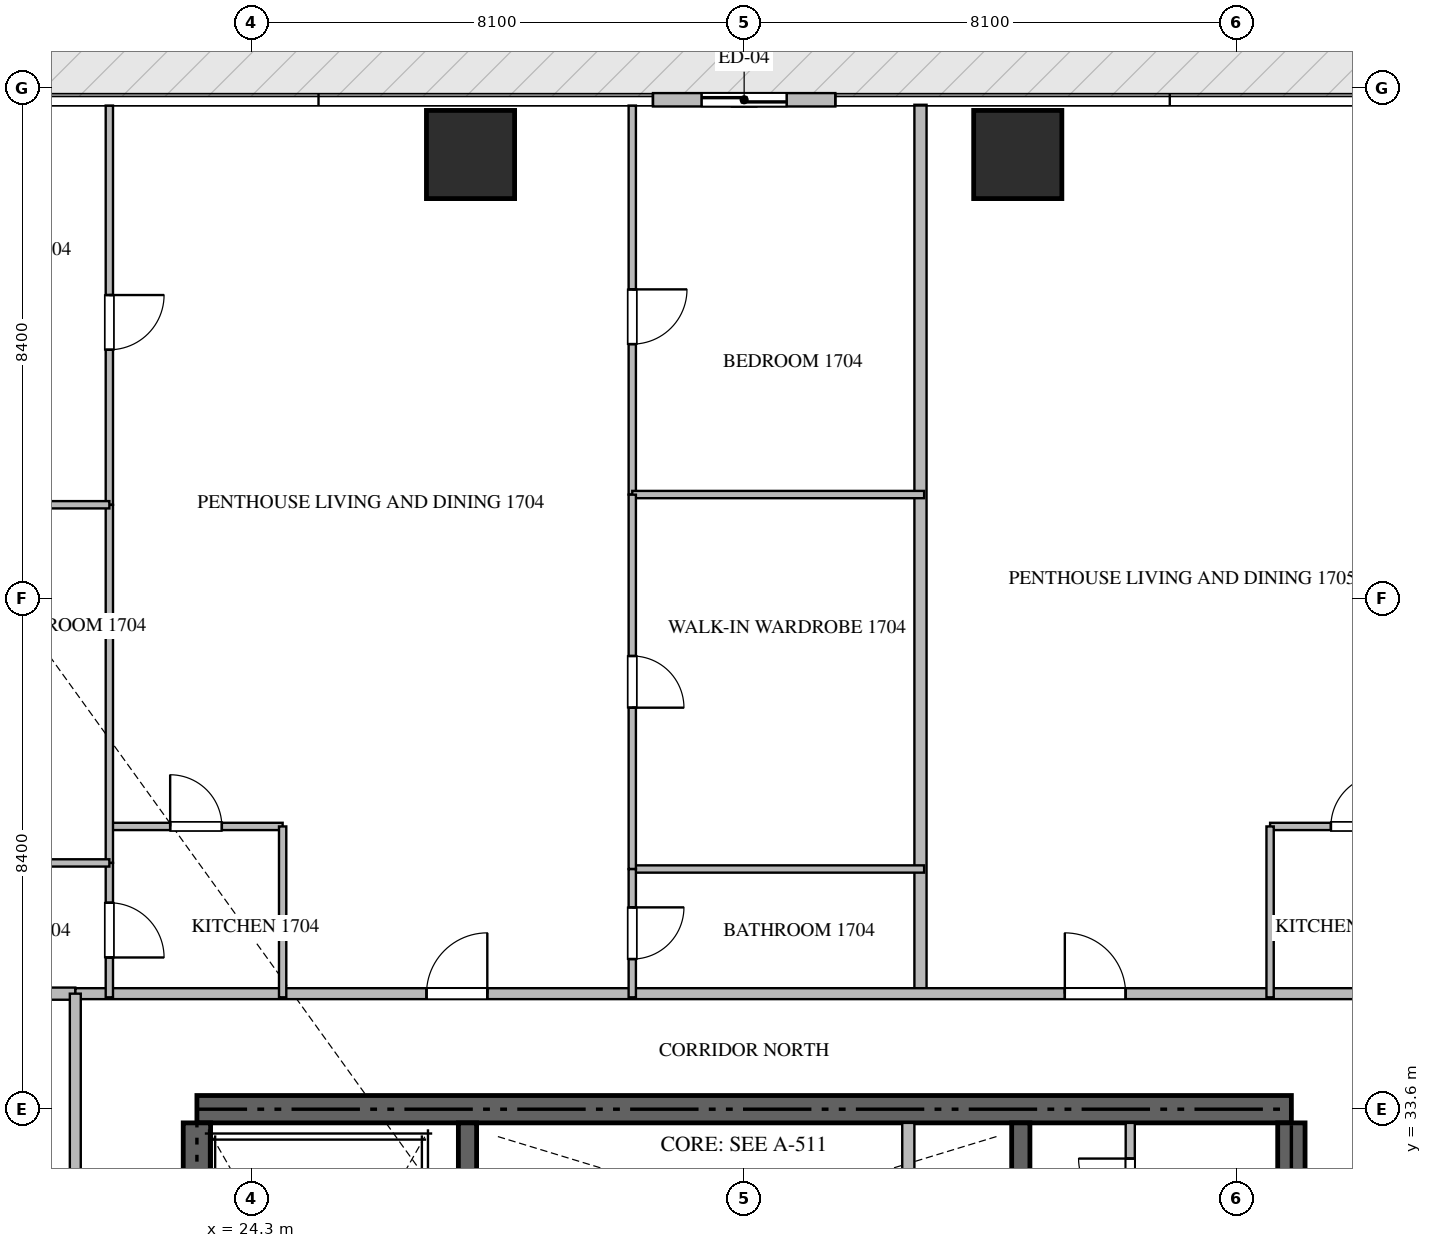
"""IFC4 building model, lengths in metres.
Left out: names, types, materials, properties, quantities, classifications, styles, units other than length and angle.
Written with IfcOpenShell. Run it as: python <this file> out.ifc"""

import sys

from ifc_helpers import new_model, si_unit, direction, frame, frame_2d, origin, origin_2d, place, context, subcontext, project, spatial, rectangle, extrude, source, transform, mapped, element, fill, save


model = new_model("IFC4")
c1 = context("Model", 3, precision=1e-05, world=origin(), true_north=direction((0.0, 1.0)))
c2 = subcontext(c1, "Body", "Model", "MODEL_VIEW")
j1 = project(units=[si_unit("LENGTHUNIT", "METRE"), si_unit("PLANEANGLEUNIT", "RADIAN")], contexts=[c1])
p1 = place(None, origin())
s1 = spatial("IfcSite", under=j1, at=p1, CompositionType="ELEMENT")
p2 = place(p1, origin())
s2 = spatial("IfcBuilding", under=s1, at=p2, CompositionType="ELEMENT")
p3 = place(p2, frame((0.0, 0.0, 71.7)))
s3 = spatial("IfcBuildingStorey", under=s2, at=p3, CompositionType="ELEMENT", Elevation=71.7)
p4 = place(p3, frame((41.4, 33.6, -0.26), z_axis=(0.0, 0.0, 1.0), x_axis=(-1.0, 0.0, 0.0)))
e1 = element("IfcWall", 1, at=p4, inside=s3, PredefinedType="SHEAR", context=c2, shape_type="SweptSolid", body=[
    extrude(rectangle(XDim=18.0, YDim=0.45, at=frame_2d((9.0, 0.0))), origin(), (0.0, 0.0, 1.0), 3.748),
])
p5 = place(p3, frame((23.4, 24.25, -0.26), z_axis=(0.0, 0.0, 1.0), x_axis=(0.0, 1.0, 0.0)))
e2 = element("IfcWall", 2, at=p5, inside=s3, PredefinedType="SHEAR", context=c2, shape_type="SweptSolid", body=[
    extrude(rectangle(XDim=9.125, YDim=0.45, at=frame_2d((4.562, 0.0))), origin(), (0.0, 0.0, 1.0), 3.748),
])
p6 = place(p3, frame((41.4, 27.75, -0.26), z_axis=(0.0, 0.0, 1.0), x_axis=(0.0, 1.0, 0.0)))
e3 = element("IfcWall", 3, at=p6, inside=s3, PredefinedType="SHEAR", context=c2, shape_type="SweptSolid", body=[
    extrude(rectangle(XDim=5.625, YDim=0.45, at=frame_2d((2.812, 0.0))), origin(), (0.0, 0.0, 1.0), 3.748),
])
p7 = place(p3, frame((27.85, 23.55, -0.26), z_axis=(0.0, 0.0, 1.0), x_axis=(0.0, 1.0, 0.0)))
e4 = element("IfcWall", 4, at=p7, inside=s3, PredefinedType="SHEAR", context=c2, shape_type="SweptSolid", body=[
    extrude(rectangle(XDim=9.825, YDim=0.3, at=frame_2d((4.913, 0.0))), origin(), (0.0, 0.0, 1.0), 3.748),
])
p8 = place(p3, frame((36.95, 27.05, -0.26), z_axis=(0.0, 0.0, 1.0), x_axis=(0.0, 1.0, 0.0)))
e5 = element("IfcWall", 5, at=p8, inside=s3, PredefinedType="SHEAR", context=c2, shape_type="SweptSolid", body=[
    extrude(rectangle(XDim=6.325, YDim=0.3, at=frame_2d((3.163, 0.0))), origin(), (0.0, 0.0, 1.0), 3.748),
])
m1 = source(origin(), c2, "Body", "SweptSolid", [
    extrude(rectangle(XDim=1.45, YDim=1.45, at=origin_2d()), origin(), (0.0, 0.0, 1.0), 3.75),
])
for number, where, z_axis, x_axis in (
    (6, (27.9, 49.3, -0.26), (0.0, 0.0, 1.0), (1.0, 0.0, 0.0)),
    (7, (36.9, 49.3, -0.26), (0.0, 0.0, 1.0), (1.0, 0.0, 0.0)),
):
    element("IfcColumn", number, at=place(p3, frame(where, z_axis=z_axis, x_axis=x_axis)), inside=s3, PredefinedType="COLUMN", context=c2, shape_type="MappedRepresentation", body=[
        mapped(m1, transform((0.0, 0.0, 0.0), scale=1.0)),
    ])
p9 = place(p3, frame((33.9, 50.2, 0.0), z_axis=(0.0, 0.0, 1.0), x_axis=(-1.0, 0.0, 0.0)))
e8 = element("IfcWall", 8, at=p9, inside=s3, PredefinedType="ELEMENTEDWALL", context=c2, shape_type="SweptSolid", body=[
    extrude(rectangle(XDim=3.0, YDim=0.22, at=frame_2d((1.5, 0.0))), origin(), (0.0, 0.0, 1.0), 3.475),
])
p10 = place(p9, frame((0.8, 0.0, 0.0)))
e9 = element("IfcOpeningElement", 9, at=p10, cuts=e8, PredefinedType="OPENING", context=c2, shape_type="SweptSolid", body=[
    extrude(rectangle(XDim=1.4, YDim=2.25, at=frame_2d((0.7, 1.125))), frame((0.0, 0.12, 0.0), z_axis=(0.0, -1.0, 0.0), x_axis=(1.0, 0.0, 0.0)), (0.0, 0.0, 1.0), 0.24),
])
p11 = place(p3, frame((35.1, 30.75, 0.0), z_axis=(0.0, 0.0, 1.0), x_axis=(0.0, 1.0, 0.0)))
e10 = element("IfcWall", 10, at=p11, inside=s3, PredefinedType="STANDARD", context=c2, shape_type="SweptSolid", body=[
    extrude(rectangle(XDim=2.625, YDim=0.2, at=frame_2d((1.312, 0.0))), origin(), (0.0, 0.0, 1.0), 3.49),
])
p12 = place(p3, frame((38.75, 31.352, 0.0), z_axis=(0.0, 0.0, 1.0), x_axis=(0.0, 1.0, 0.0)))
e11 = element("IfcWall", 11, at=p12, inside=s3, PredefinedType="PARTITIONING", context=c2, shape_type="SweptSolid", body=[
    extrude(rectangle(XDim=2.023, YDim=0.15, at=frame_2d((1.011, 0.0))), origin(), (0.0, 0.0, 1.0), 3.49),
])
p13 = place(p12, frame((0.586, 0.0, 0.0)))
e12 = element("IfcOpeningElement", 12, at=p13, cuts=e11, PredefinedType="OPENING", context=c2, shape_type="SweptSolid", body=[
    extrude(rectangle(XDim=0.85, YDim=2.1, at=frame_2d((0.425, 1.05))), frame((0.0, 0.085, 0.0), z_axis=(0.0, -1.0, 0.0), x_axis=(1.0, 0.0, 0.0)), (0.0, 0.0, 1.0), 0.17),
])
p14 = place(p3, frame((35.3, 35.5, 0.0), z_axis=(0.0, 0.0, 1.0), x_axis=(0.0, 1.0, 0.0)))
e13 = element("IfcWall", 13, at=p14, inside=s3, PredefinedType="PARTITIONING", context=c2, shape_type="SweptSolid", body=[
    extrude(rectangle(XDim=14.618, YDim=0.2, at=frame_2d((7.309, 0.0))), origin(), (0.0, 0.0, 1.0), 3.49),
])
p15 = place(p3, frame((6.082, 35.5, 0.0), z_axis=(0.0, 0.0, 1.0), x_axis=(1.0, 0.0, 0.0)))
e14 = element("IfcWall", 14, at=p15, inside=s3, PredefinedType="PARTITIONING", context=c2, shape_type="SweptSolid", body=[
    extrude(rectangle(XDim=15.318, YDim=0.2, at=frame_2d((7.659, 0.0))), origin(), (0.0, 0.0, 1.0), 3.49),
])
p16 = place(p3, frame((21.402, 35.5, 0.0), z_axis=(0.0, 0.0, 1.0), x_axis=(1.0, 0.0, 0.0)))
e15 = element("IfcWall", 15, at=p16, inside=s3, PredefinedType="PARTITIONING", context=c2, shape_type="SweptSolid", body=[
    extrude(rectangle(XDim=21.996, YDim=0.18, at=frame_2d((10.998, 0.0))), origin(), (0.0, 0.0, 1.0), 3.49),
])
p17 = place(p16, frame((5.774, 0.0, 0.0)))
e16 = element("IfcOpeningElement", 16, at=p17, cuts=e15, PredefinedType="OPENING", context=c2, shape_type="SweptSolid", body=[
    extrude(rectangle(XDim=1.0, YDim=2.15, at=frame_2d((0.5, 1.075))), frame((0.0, 0.1, 0.0), z_axis=(0.0, -1.0, 0.0), x_axis=(1.0, 0.0, 0.0)), (0.0, 0.0, 1.0), 0.2),
])
p18 = place(p16, frame((16.272, 0.0, 0.0)))
e17 = element("IfcOpeningElement", 17, at=p18, cuts=e15, PredefinedType="OPENING", context=c2, shape_type="SweptSolid", body=[
    extrude(rectangle(XDim=1.0, YDim=2.15, at=frame_2d((0.5, 1.075))), frame((0.0, 0.1, 0.0), z_axis=(0.0, -1.0, 0.0), x_axis=(1.0, 0.0, 0.0)), (0.0, 0.0, 1.0), 0.2),
])
p19 = place(p3, frame((21.4, 14.9, 0.0), z_axis=(0.0, 0.0, 1.0), x_axis=(0.0, 1.0, 0.0)))
e18 = element("IfcWall", 18, at=p19, inside=s3, PredefinedType="PARTITIONING", context=c2, shape_type="SweptSolid", body=[
    extrude(rectangle(XDim=20.6, YDim=0.18, at=frame_2d((10.3, 0.0))), origin(), (0.0, 0.0, 1.0), 3.49),
])
p20 = place(p19, frame((1.96, 0.0, 0.0)))
e19 = element("IfcOpeningElement", 19, at=p20, cuts=e18, PredefinedType="OPENING", context=c2, shape_type="SweptSolid", body=[
    extrude(rectangle(XDim=1.0, YDim=2.15, at=frame_2d((0.5, 1.075))), frame((0.0, 0.1, 0.0), z_axis=(0.0, -1.0, 0.0), x_axis=(1.0, 0.0, 0.0)), (0.0, 0.0, 1.0), 0.2),
])
p21 = place(p19, frame((15.778, 0.0, 0.0)))
e20 = element("IfcOpeningElement", 20, at=p21, cuts=e18, PredefinedType="OPENING", context=c2, shape_type="SweptSolid", body=[
    extrude(rectangle(XDim=1.0, YDim=2.15, at=frame_2d((0.5, 1.075))), frame((0.0, 0.1, 0.0), z_axis=(0.0, -1.0, 0.0), x_axis=(1.0, 0.0, 0.0)), (0.0, 0.0, 1.0), 0.2),
])
p22 = place(p3, frame((21.96, 38.25, 0.0), z_axis=(0.0, 0.0, 1.0), x_axis=(1.0, 0.0, 0.0)))
e21 = element("IfcWall", 21, at=p22, inside=s3, PredefinedType="PARTITIONING", context=c2, shape_type="SweptSolid", body=[
    extrude(rectangle(XDim=2.85, YDim=0.12, at=frame_2d((1.425, 0.0))), origin(), (0.0, 0.0, 1.0), 3.49),
])
p23 = place(p22, frame((1.0, 0.0, 0.0)))
e22 = element("IfcOpeningElement", 22, at=p23, cuts=e21, PredefinedType="OPENING", context=c2, shape_type="SweptSolid", body=[
    extrude(rectangle(XDim=0.85, YDim=2.1, at=frame_2d((0.425, 1.05))), frame((0.0, 0.07, 0.0), z_axis=(0.0, -1.0, 0.0), x_axis=(1.0, 0.0, 0.0)), (0.0, 0.0, 1.0), 0.14),
])
p24 = place(p3, frame((24.81, 38.25, 0.0), z_axis=(0.0, 0.0, 1.0), x_axis=(0.0, -1.0, 0.0)))
e23 = element("IfcWall", 23, at=p24, inside=s3, PredefinedType="PARTITIONING", context=c2, shape_type="SweptSolid", body=[
    extrude(rectangle(XDim=2.81, YDim=0.12, at=frame_2d((1.405, 0.0))), origin(), (0.0, 0.0, 1.0), 3.49),
])
p25 = place(p3, frame((21.96, 37.65, 0.0), z_axis=(0.0, 0.0, 1.0), x_axis=(0.0, -1.0, 0.0)))
e24 = element("IfcWall", 24, at=p25, inside=s3, PredefinedType="PARTITIONING", context=c2, shape_type="SweptSolid", body=[
    extrude(rectangle(XDim=2.21, YDim=0.12, at=frame_2d((1.105, 0.0))), origin(), (0.0, 0.0, 1.0), 3.49),
])
p26 = place(p25, frame((0.655, 0.0, 0.0)))
e25 = element("IfcOpeningElement", 25, at=p26, cuts=e24, PredefinedType="OPENING", context=c2, shape_type="SweptSolid", body=[
    extrude(rectangle(XDim=0.9, YDim=2.1, at=frame_2d((0.45, 1.05))), frame((0.0, 0.07, 0.0), z_axis=(0.0, -1.0, 0.0), x_axis=(1.0, 0.0, 0.0)), (0.0, 0.0, 1.0), 0.14),
])
p27 = place(p3, frame((21.96, 50.105, 0.0), z_axis=(0.0, 0.0, 1.0), x_axis=(0.0, -1.0, 0.0)))
e26 = element("IfcWall", 26, at=p27, inside=s3, PredefinedType="PARTITIONING", context=c2, shape_type="SweptSolid", body=[
    extrude(rectangle(XDim=6.565, YDim=0.12, at=frame_2d((3.282, 0.0))), origin(), (0.0, 0.0, 1.0), 3.49),
])
p28 = place(p27, frame((3.116, 0.0, 0.0)))
e27 = element("IfcOpeningElement", 27, at=p28, cuts=e26, PredefinedType="OPENING", context=c2, shape_type="SweptSolid", body=[
    extrude(rectangle(XDim=0.9, YDim=2.1, at=frame_2d((0.45, 1.05))), frame((0.0, 0.07, 0.0), z_axis=(0.0, -1.0, 0.0), x_axis=(1.0, 0.0, 0.0)), (0.0, 0.0, 1.0), 0.14),
])
p29 = place(p3, frame((21.96, 43.538, 0.0), z_axis=(0.0, 0.0, 1.0), x_axis=(0.0, -1.0, 0.0)))
e28 = element("IfcWall", 28, at=p29, inside=s3, PredefinedType="PARTITIONING", context=c2, shape_type="SweptSolid", body=[
    extrude(rectangle(XDim=5.886, YDim=0.12, at=frame_2d((2.943, 0.0))), origin(), (0.0, 0.0, 1.0), 3.49),
])
p30 = place(p3, frame((16.81, 43.54, 0.0), z_axis=(0.0, 0.0, 1.0), x_axis=(1.0, 0.0, 0.0)))
e29 = element("IfcWall", 29, at=p30, inside=s3, PredefinedType="PARTITIONING", context=c2, shape_type="SweptSolid", body=[
    extrude(rectangle(XDim=5.15, YDim=0.12, at=frame_2d((2.575, 0.0))), origin(), (0.0, 0.0, 1.0), 3.49),
])
p31 = place(p3, frame((18.912, 37.65, 0.0), z_axis=(0.0, 0.0, 1.0), x_axis=(1.0, 0.0, 0.0)))
e30 = element("IfcWall", 30, at=p31, inside=s3, PredefinedType="PARTITIONING", context=c2, shape_type="SweptSolid", body=[
    extrude(rectangle(XDim=3.048, YDim=0.12, at=frame_2d((1.524, 0.0))), origin(), (0.0, 0.0, 1.0), 3.49),
])
p32 = place(p31, frame((1.099, 0.0, 0.0)))
e31 = element("IfcOpeningElement", 31, at=p32, cuts=e30, PredefinedType="OPENING", context=c2, shape_type="SweptSolid", body=[
    extrude(rectangle(XDim=0.85, YDim=2.1, at=frame_2d((0.425, 1.05))), frame((0.0, 0.07, 0.0), z_axis=(0.0, -1.0, 0.0), x_axis=(1.0, 0.0, 0.0)), (0.0, 0.0, 1.0), 0.14),
])
p33 = place(p3, frame((30.56, 50.105, 0.0), z_axis=(0.0, 0.0, 1.0), x_axis=(0.0, -1.0, 0.0)))
e32 = element("IfcWall", 32, at=p33, inside=s3, PredefinedType="PARTITIONING", context=c2, shape_type="SweptSolid", body=[
    extrude(rectangle(XDim=6.397, YDim=0.12, at=frame_2d((3.198, 0.0))), origin(), (0.0, 0.0, 1.0), 3.49),
])
p34 = place(p33, frame((3.023, 0.0, 0.0)))
e33 = element("IfcOpeningElement", 33, at=p34, cuts=e32, PredefinedType="OPENING", context=c2, shape_type="SweptSolid", body=[
    extrude(rectangle(XDim=0.9, YDim=2.1, at=frame_2d((0.45, 1.05))), frame((0.0, 0.07, 0.0), z_axis=(0.0, -1.0, 0.0), x_axis=(1.0, 0.0, 0.0)), (0.0, 0.0, 1.0), 0.14),
])
for number, where, z_axis, x_axis in (
    (34, (30.56, 43.708, 0.0), (0.0, 0.0, 1.0), (1.0, 0.0, 0.0)),
    (35, (30.56, 37.55, 0.0), (0.0, 0.0, 1.0), (1.0, 0.0, 0.0)),
):
    element("IfcWall", number, at=place(p3, frame(where, z_axis=z_axis, x_axis=x_axis)), inside=s3, PredefinedType="PARTITIONING", context=c2, shape_type="SweptSolid", body=[
        extrude(rectangle(XDim=4.8, YDim=0.12, at=frame_2d((2.4, 0.0))), origin(), (0.0, 0.0, 1.0), 3.49),
    ])
p35 = place(p3, frame((30.56, 43.706, 0.0), z_axis=(0.0, 0.0, 1.0), x_axis=(0.0, -1.0, 0.0)))
e36 = element("IfcWall", 36, at=p35, inside=s3, PredefinedType="PARTITIONING", context=c2, shape_type="SweptSolid", body=[
    extrude(rectangle(XDim=6.156, YDim=0.12, at=frame_2d((3.078, 0.0))), origin(), (0.0, 0.0, 1.0), 3.49),
])
p36 = place(p35, frame((2.653, 0.0, 0.0)))
e37 = element("IfcOpeningElement", 37, at=p36, cuts=e36, PredefinedType="OPENING", context=c2, shape_type="SweptSolid", body=[
    extrude(rectangle(XDim=0.85, YDim=2.1, at=frame_2d((0.425, 1.05))), frame((0.0, 0.07, 0.0), z_axis=(0.0, -1.0, 0.0), x_axis=(1.0, 0.0, 0.0)), (0.0, 0.0, 1.0), 0.14),
])
p37 = place(p3, frame((30.56, 37.548, 0.0), z_axis=(0.0, 0.0, 1.0), x_axis=(0.0, -1.0, 0.0)))
e38 = element("IfcWall", 38, at=p37, inside=s3, PredefinedType="PARTITIONING", context=c2, shape_type="SweptSolid", body=[
    extrude(rectangle(XDim=2.108, YDim=0.12, at=frame_2d((1.054, 0.0))), origin(), (0.0, 0.0, 1.0), 3.49),
])
p38 = place(p37, frame((0.629, 0.0, 0.0)))
e39 = element("IfcOpeningElement", 39, at=p38, cuts=e38, PredefinedType="OPENING", context=c2, shape_type="SweptSolid", body=[
    extrude(rectangle(XDim=0.85, YDim=2.1, at=frame_2d((0.425, 1.05))), frame((0.0, 0.07, 0.0), z_axis=(0.0, -1.0, 0.0), x_axis=(1.0, 0.0, 0.0)), (0.0, 0.0, 1.0), 0.14),
])
p39 = place(p3, frame((41.05, 38.25, 0.0), z_axis=(0.0, 0.0, 1.0), x_axis=(1.0, 0.0, 0.0)))
e40 = element("IfcWall", 40, at=p39, inside=s3, PredefinedType="PARTITIONING", context=c2, shape_type="SweptSolid", body=[
    extrude(rectangle(XDim=2.85, YDim=0.12, at=frame_2d((1.425, 0.0))), origin(), (0.0, 0.0, 1.0), 3.49),
])
p40 = place(p39, frame((1.0, 0.0, 0.0)))
e41 = element("IfcOpeningElement", 41, at=p40, cuts=e40, PredefinedType="OPENING", context=c2, shape_type="SweptSolid", body=[
    extrude(rectangle(XDim=0.85, YDim=2.1, at=frame_2d((0.425, 1.05))), frame((0.0, 0.07, 0.0), z_axis=(0.0, -1.0, 0.0), x_axis=(1.0, 0.0, 0.0)), (0.0, 0.0, 1.0), 0.14),
])
p41 = place(p3, frame((41.05, 38.25, 0.0), z_axis=(0.0, 0.0, 1.0), x_axis=(0.0, -1.0, 0.0)))
e42 = element("IfcWall", 42, at=p41, inside=s3, PredefinedType="PARTITIONING", context=c2, shape_type="SweptSolid", body=[
    extrude(rectangle(XDim=2.81, YDim=0.12, at=frame_2d((1.405, 0.0))), origin(), (0.0, 0.0, 1.0), 3.49),
])
m2 = source(origin(), c2, "Body", "SweptSolid", [
    extrude(rectangle(XDim=1.4, YDim=2.25, at=frame_2d((0.7, 1.125))), frame((0.0, 0.025, 0.0), z_axis=(0.0, -1.0, 0.0), x_axis=(1.0, 0.0, 0.0)), (0.0, 0.0, 1.0), 0.05),
])
p42 = place(p10, origin())
e43 = element("IfcDoor", 43, at=p42, inside=s3, OperationType="SLIDING_TO_LEFT", PredefinedType="DOOR", context=c2, shape_type="MappedRepresentation", body=[
    mapped(m2, transform((0.0, 0.0, 0.0), scale=1.0)),
])
fill(e9, e43)
m3 = source(origin(), c2, "Body", "SweptSolid", [
    extrude(rectangle(XDim=0.85, YDim=2.1, at=frame_2d((0.425, 1.05))), frame((0.0, 0.025, 0.0), z_axis=(0.0, -1.0, 0.0), x_axis=(1.0, 0.0, 0.0)), (0.0, 0.0, 1.0), 0.05),
])
p43 = place(p13, origin())
e44 = element("IfcDoor", 44, at=p43, inside=s3, OperationType="SINGLE_SWING_RIGHT", PredefinedType="DOOR", context=c2, shape_type="MappedRepresentation", body=[
    mapped(m3, transform((0.0, 0.0, 0.0), scale=1.0)),
])
fill(e12, e44)
m4 = source(origin(), c2, "Body", "SweptSolid", [
    extrude(rectangle(XDim=1.0, YDim=2.15, at=frame_2d((0.5, 1.075))), frame((0.0, 0.025, 0.0), z_axis=(0.0, -1.0, 0.0), x_axis=(1.0, 0.0, 0.0)), (0.0, 0.0, 1.0), 0.05),
])
p44 = place(p17, origin())
e45 = element("IfcDoor", 45, at=p44, inside=s3, OperationType="SINGLE_SWING_RIGHT", PredefinedType="DOOR", context=c2, shape_type="MappedRepresentation", body=[
    mapped(m4, transform((0.0, 0.0, 0.0), scale=1.0)),
])
fill(e16, e45)
p45 = place(p18, origin())
e46 = element("IfcDoor", 46, at=p45, inside=s3, OperationType="SINGLE_SWING_LEFT", PredefinedType="DOOR", context=c2, shape_type="MappedRepresentation", body=[
    mapped(m4, transform((0.0, 0.0, 0.0), scale=1.0)),
])
fill(e17, e46)
p46 = place(p23, origin())
e47 = element("IfcDoor", 47, at=p46, inside=s3, OperationType="SINGLE_SWING_LEFT", PredefinedType="DOOR", context=c2, shape_type="MappedRepresentation", body=[
    mapped(m3, transform((0.0, 0.0, 0.0), scale=1.0)),
])
fill(e22, e47)
m5 = source(origin(), c2, "Body", "SweptSolid", [
    extrude(rectangle(XDim=0.9, YDim=2.1, at=frame_2d((0.45, 1.05))), frame((0.0, 0.025, 0.0), z_axis=(0.0, -1.0, 0.0), x_axis=(1.0, 0.0, 0.0)), (0.0, 0.0, 1.0), 0.05),
])
p47 = place(p26, origin())
e48 = element("IfcDoor", 48, at=p47, inside=s3, OperationType="SINGLE_SWING_RIGHT", PredefinedType="DOOR", context=c2, shape_type="MappedRepresentation", body=[
    mapped(m5, transform((0.0, 0.0, 0.0), scale=1.0)),
])
fill(e25, e48)
p48 = place(p28, origin())
e49 = element("IfcDoor", 49, at=p48, inside=s3, OperationType="SINGLE_SWING_LEFT", PredefinedType="DOOR", context=c2, shape_type="MappedRepresentation", body=[
    mapped(m5, transform((0.0, 0.0, 0.0), scale=1.0)),
])
fill(e27, e49)
p49 = place(p34, origin())
e50 = element("IfcDoor", 50, at=p49, inside=s3, OperationType="SINGLE_SWING_LEFT", PredefinedType="DOOR", context=c2, shape_type="MappedRepresentation", body=[
    mapped(m5, transform((0.0, 0.0, 0.0), scale=1.0)),
])
fill(e33, e50)
p50 = place(p36, origin())
e51 = element("IfcDoor", 51, at=p50, inside=s3, OperationType="SINGLE_SWING_RIGHT", PredefinedType="DOOR", context=c2, shape_type="MappedRepresentation", body=[
    mapped(m3, transform((0.0, 0.0, 0.0), scale=1.0)),
])
fill(e37, e51)
p51 = place(p38, origin())
e52 = element("IfcDoor", 52, at=p51, inside=s3, OperationType="SINGLE_SWING_LEFT", PredefinedType="DOOR", context=c2, shape_type="MappedRepresentation", body=[
    mapped(m3, transform((0.0, 0.0, 0.0), scale=1.0)),
])
fill(e39, e52)
p52 = place(p40, origin())
e53 = element("IfcDoor", 53, at=p52, inside=s3, OperationType="SINGLE_SWING_RIGHT", PredefinedType="DOOR", context=c2, shape_type="MappedRepresentation", body=[
    mapped(m3, transform((0.0, 0.0, 0.0), scale=1.0)),
])
fill(e41, e53)
save(model, sys.argv[1])
